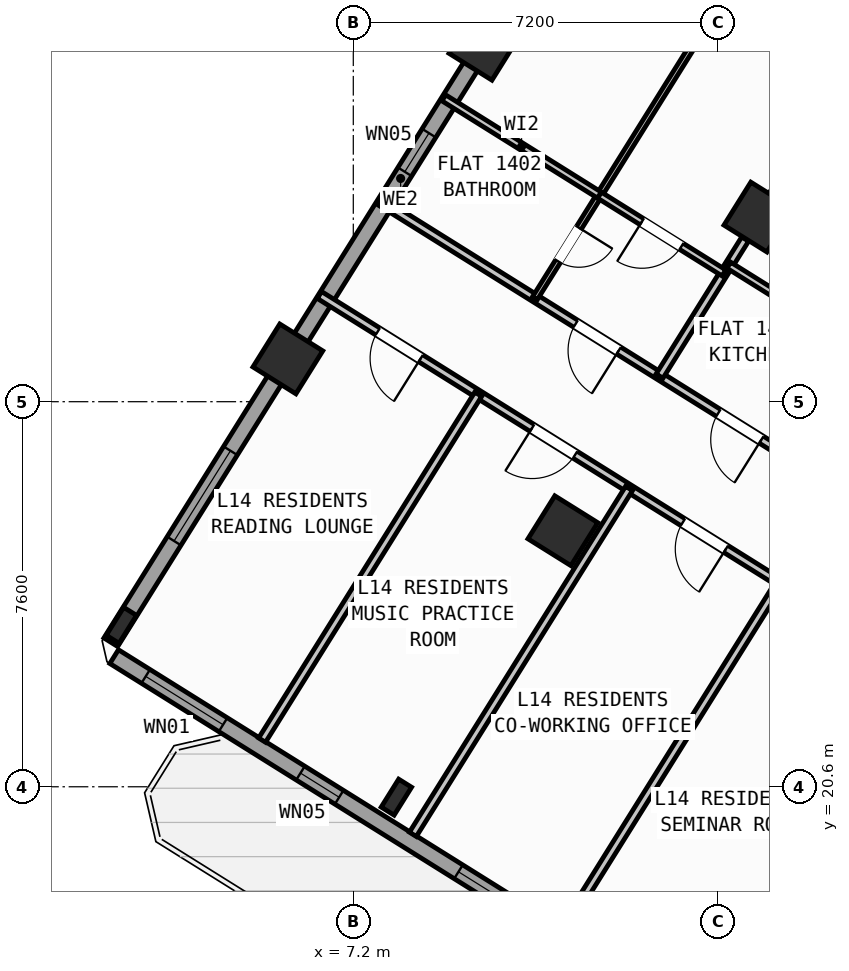
"""IFC4 building model, lengths in metres.
Left out: names, types, materials, properties, quantities, classifications, styles, units other than length and angle.
Written with IfcOpenShell. Run it as: python <this file> out.ifc"""

import sys

from ifc_helpers import new_model, si_unit, direction, frame, frame_2d, origin, origin_2d, place, context, subcontext, project, spatial, rectangle, hollow_rectangle, i_section, extrude, source, transform, mapped, element, fill, save


model = new_model("IFC4")
c1 = context("Model", 3, precision=1e-05, world=origin(), true_north=direction((0.0, 1.0)))
c2 = subcontext(c1, "Body", "Model", "MODEL_VIEW")
j1 = project(units=[si_unit("LENGTHUNIT", "METRE"), si_unit("PLANEANGLEUNIT", "RADIAN")], contexts=[c1])
p1 = place(None, origin())
s1 = spatial("IfcSite", under=j1, at=p1, CompositionType="ELEMENT")
p2 = place(p1, origin())
s2 = spatial("IfcBuilding", under=s1, at=p2, CompositionType="ELEMENT")
p3 = place(p2, frame((0.0, 0.0, 56.4)))
s3 = spatial("IfcBuildingStorey", under=s2, at=p3, CompositionType="ELEMENT", Elevation=56.4)
m1 = source(origin(), c2, "Body", "SweptSolid", [
    extrude(hollow_rectangle(XDim=1.0, YDim=1.0, WallThickness=0.04, at=origin_2d()), origin(), (0.0, 0.0, 1.0), 3.6),
])
for number, where, z_axis, x_axis in (
    (1, (15.205, 31.844, 0.0), (0.0, 0.0, 1.0), (-0.848, 0.53, 0.0)),
    (2, (11.336, 25.653, 0.0), (0.0, 0.0, 1.0), (-0.848, 0.53, 0.0)),
):
    element("IfcColumn", number, at=place(p3, frame(where, z_axis=z_axis, x_axis=x_axis)), inside=s3, PredefinedType="COLUMN", context=c2, shape_type="MappedRepresentation", body=[
        mapped(m1, transform((0.0, 0.0, 0.0), scale=1.0)),
    ])
m2 = source(origin(), c2, "Body", "SweptSolid", [
    extrude(i_section(OverallWidth=0.3, OverallDepth=0.65, WebThickness=0.016, FlangeThickness=0.031, at=origin_2d()), origin(), (0.0, 0.0, 1.0), 3.6),
])
p4 = place(p3, frame((8.051, 20.395, 0.0), z_axis=(0.0, 0.0, 1.0), x_axis=(-0.848048096156, 0.529919264233, 0.0)))
e3 = element("IfcColumn", 3, at=p4, inside=s3, PredefinedType="COLUMN", context=c2, shape_type="MappedRepresentation", body=[
    mapped(m2, transform((0.0, 0.0, 0.0), scale=1.0)),
])
for number, where, z_axis, x_axis in (
    (4, (9.777, 35.235, 0.0), (0.0, 0.0, 1.0), (-0.848, 0.53, 0.0)),
    (5, (5.909, 29.044, 0.0), (0.0, 0.0, 1.0), (-0.848, 0.53, 0.0)),
):
    element("IfcColumn", number, at=place(p3, frame(where, z_axis=z_axis, x_axis=x_axis)), inside=s3, PredefinedType="COLUMN", context=c2, shape_type="MappedRepresentation", body=[
        mapped(m1, transform((0.0, 0.0, 0.0), scale=1.0)),
    ])
p5 = place(p3, frame((2.623, 23.786, 0.0), z_axis=(0.0, 0.0, 1.0), x_axis=(-0.848048096156, 0.529919264233, 0.0)))
e6 = element("IfcColumn", 6, at=p5, inside=s3, PredefinedType="COLUMN", context=c2, shape_type="MappedRepresentation", body=[
    mapped(m2, transform((0.0, 0.0, 0.0), scale=1.0)),
])
p6 = place(p3, frame((29.268, 6.429, 0.0), z_axis=(0.0, 0.0, 1.0), x_axis=(-0.848049971435, 0.529916263149, 0.0)))
e7 = element("IfcWall", 7, at=p6, inside=s3, PredefinedType="STANDARD", context=c2, shape_type="SweptSolid", body=[
    extrude(rectangle(XDim=31.588, YDim=0.32, at=frame_2d((15.794, 0.0))), origin(), (0.0, 0.0, 1.0), 3.35),
])
p7 = place(p6, frame((16.235, 0.0, 0.0)))
e8 = element("IfcOpeningElement", 8, at=p7, cuts=e7, PredefinedType="OPENING", context=c2, shape_type="SweptSolid", body=[
    extrude(rectangle(XDim=1.2, YDim=2.15, at=frame_2d((0.6, 1.075))), frame((0.0, 0.17, 0.0), z_axis=(0.0, -1.0, 0.0), x_axis=(1.0, 0.0, 0.0)), (0.0, 0.0, 1.0), 0.34),
])
p8 = place(p6, frame((2.989, 0.0, 0.8)))
e9 = element("IfcOpeningElement", 9, at=p8, cuts=e7, PredefinedType="OPENING", context=c2, shape_type="SweptSolid", body=[
    extrude(rectangle(XDim=2.1, YDim=1.55, at=frame_2d((1.05, 0.775))), frame((0.0, 0.17, 0.0), z_axis=(0.0, -1.0, 0.0), x_axis=(1.0, 0.0, 0.0)), (0.0, 0.0, 1.0), 0.34),
])
p9 = place(p6, frame((8.359, 0.0, 0.8)))
e10 = element("IfcOpeningElement", 10, at=p9, cuts=e7, PredefinedType="OPENING", context=c2, shape_type="SweptSolid", body=[
    extrude(rectangle(XDim=2.1, YDim=1.55, at=frame_2d((1.05, 0.775))), frame((0.0, 0.17, 0.0), z_axis=(0.0, -1.0, 0.0), x_axis=(1.0, 0.0, 0.0)), (0.0, 0.0, 1.0), 0.34),
])
p10 = place(p6, frame((13.284, 0.0, 0.95)))
e11 = element("IfcOpeningElement", 11, at=p10, cuts=e7, PredefinedType="OPENING", context=c2, shape_type="SweptSolid", body=[
    extrude(rectangle(XDim=1.2, YDim=1.4, at=frame_2d((0.6, 0.7))), frame((0.0, 0.17, 0.0), z_axis=(0.0, -1.0, 0.0), x_axis=(1.0, 0.0, 0.0)), (0.0, 0.0, 1.0), 0.34),
])
p11 = place(p6, frame((22.374, 0.0, 0.95)))
e12 = element("IfcOpeningElement", 12, at=p11, cuts=e7, PredefinedType="OPENING", context=c2, shape_type="SweptSolid", body=[
    extrude(rectangle(XDim=1.2, YDim=1.4, at=frame_2d((0.6, 0.7))), frame((0.0, 0.17, 0.0), z_axis=(0.0, -1.0, 0.0), x_axis=(1.0, 0.0, 0.0)), (0.0, 0.0, 1.0), 0.34),
])
p12 = place(p6, frame((26.351, 0.0, 1.0)))
e13 = element("IfcOpeningElement", 13, at=p12, cuts=e7, PredefinedType="OPENING", context=c2, shape_type="SweptSolid", body=[
    extrude(rectangle(XDim=0.9, YDim=1.25, at=frame_2d((0.45, 0.625))), frame((0.0, 0.17, 0.0), z_axis=(0.0, -1.0, 0.0), x_axis=(1.0, 0.0, 0.0)), (0.0, 0.0, 1.0), 0.34),
])
p13 = place(p6, frame((29.052, 0.0, 0.85)))
e14 = element("IfcOpeningElement", 14, at=p13, cuts=e7, PredefinedType="OPENING", context=c2, shape_type="SweptSolid", body=[
    extrude(rectangle(XDim=1.8, YDim=1.5, at=frame_2d((0.9, 0.75))), frame((0.0, 0.17, 0.0), z_axis=(0.0, -1.0, 0.0), x_axis=(1.0, 0.0, 0.0)), (0.0, 0.0, 1.0), 0.34),
])
p14 = place(p3, frame((2.415, 23.452, 0.0), z_axis=(0.0, 0.0, 1.0), x_axis=(0.52991049553, 0.848053575387, 0.0)))
e15 = element("IfcWall", 15, at=p14, inside=s3, PredefinedType="STANDARD", context=c2, shape_type="SweptSolid", body=[
    extrude(rectangle(XDim=21.587, YDim=0.32, at=frame_2d((10.794, 0.0))), origin(), (0.0, 0.0, 1.0), 2.725),
])
p15 = place(p14, frame((2.356, 0.0, 0.8)))
e16 = element("IfcOpeningElement", 16, at=p15, cuts=e15, PredefinedType="OPENING", context=c2, shape_type="SweptSolid", body=[
    extrude(rectangle(XDim=2.1, YDim=1.55, at=frame_2d((1.05, 0.775))), frame((0.0, 0.17, 0.0), z_axis=(0.0, -1.0, 0.0), x_axis=(1.0, 0.0, 0.0)), (0.0, 0.0, 1.0), 0.34),
])
p16 = place(p14, frame((10.949, 0.0, 1.0)))
e17 = element("IfcOpeningElement", 17, at=p16, cuts=e15, PredefinedType="OPENING", context=c2, shape_type="SweptSolid", body=[
    extrude(rectangle(XDim=0.9, YDim=1.25, at=frame_2d((0.45, 0.625))), frame((0.0, 0.17, 0.0), z_axis=(0.0, -1.0, 0.0), x_axis=(1.0, 0.0, 0.0)), (0.0, 0.0, 1.0), 0.34),
])
p17 = place(p14, frame((15.394, 0.0, 0.85)))
e18 = element("IfcOpeningElement", 18, at=p17, cuts=e15, PredefinedType="OPENING", context=c2, shape_type="SweptSolid", body=[
    extrude(rectangle(XDim=1.5, YDim=1.5, at=frame_2d((0.75, 0.75))), frame((0.0, 0.17, 0.0), z_axis=(0.0, -1.0, 0.0), x_axis=(1.0, 0.0, 0.0)), (0.0, 0.0, 1.0), 0.34),
])
p18 = place(p14, frame((18.194, 0.0, 0.85)))
e19 = element("IfcOpeningElement", 19, at=p18, cuts=e15, PredefinedType="OPENING", context=c2, shape_type="SweptSolid", body=[
    extrude(rectangle(XDim=1.5, YDim=1.5, at=frame_2d((0.75, 0.75))), frame((0.0, 0.17, 0.0), z_axis=(0.0, -1.0, 0.0), x_axis=(1.0, 0.0, 0.0)), (0.0, 0.0, 1.0), 0.34),
])
p19 = place(p3, frame((14.138, 41.825, 0.0), z_axis=(0.0, 0.0, 1.0), x_axis=(0.848046498049, -0.529921821731, 0.0)))
e20 = element("IfcWall", 20, at=p19, inside=s3, PredefinedType="STANDARD", context=c2, shape_type="SweptSolid", body=[
    extrude(rectangle(XDim=31.588, YDim=0.32, at=frame_2d((15.794, 0.0))), origin(), (0.0, 0.0, 1.0), 3.35),
])
p20 = place(p19, frame((9.772, 0.0, 0.0)))
e21 = element("IfcOpeningElement", 21, at=p20, cuts=e20, PredefinedType="OPENING", context=c2, shape_type="SweptSolid", body=[
    extrude(rectangle(XDim=1.05, YDim=2.15, at=frame_2d((0.525, 1.075))), frame((0.0, 0.17, 0.0), z_axis=(0.0, -1.0, 0.0), x_axis=(1.0, 0.0, 0.0)), (0.0, 0.0, 1.0), 0.34),
])
p21 = place(p19, frame((0.966, 0.0, 0.85)))
e22 = element("IfcOpeningElement", 22, at=p21, cuts=e20, PredefinedType="OPENING", context=c2, shape_type="SweptSolid", body=[
    extrude(rectangle(XDim=1.5, YDim=1.5, at=frame_2d((0.75, 0.75))), frame((0.0, 0.17, 0.0), z_axis=(0.0, -1.0, 0.0), x_axis=(1.0, 0.0, 0.0)), (0.0, 0.0, 1.0), 0.34),
])
p22 = place(p19, frame((4.121, 0.0, 1.0)))
e23 = element("IfcOpeningElement", 23, at=p22, cuts=e20, PredefinedType="OPENING", context=c2, shape_type="SweptSolid", body=[
    extrude(rectangle(XDim=0.9, YDim=1.25, at=frame_2d((0.45, 0.625))), frame((0.0, 0.17, 0.0), z_axis=(0.0, -1.0, 0.0), x_axis=(1.0, 0.0, 0.0)), (0.0, 0.0, 1.0), 0.34),
])
p23 = place(p19, frame((13.899, 0.0, 0.85)))
e24 = element("IfcOpeningElement", 24, at=p23, cuts=e20, PredefinedType="OPENING", context=c2, shape_type="SweptSolid", body=[
    extrude(rectangle(XDim=1.5, YDim=1.5, at=frame_2d((0.75, 0.75))), frame((0.0, 0.17, 0.0), z_axis=(0.0, -1.0, 0.0), x_axis=(1.0, 0.0, 0.0)), (0.0, 0.0, 1.0), 0.34),
])
p24 = place(p19, frame((22.019, 0.0, 0.95)))
e25 = element("IfcOpeningElement", 25, at=p24, cuts=e20, PredefinedType="OPENING", context=c2, shape_type="SweptSolid", body=[
    extrude(rectangle(XDim=1.2, YDim=1.4, at=frame_2d((0.6, 0.7))), frame((0.0, 0.17, 0.0), z_axis=(0.0, -1.0, 0.0), x_axis=(1.0, 0.0, 0.0)), (0.0, 0.0, 1.0), 0.34),
])
p25 = place(p19, frame((27.569, 0.0, 0.95)))
e26 = element("IfcOpeningElement", 26, at=p25, cuts=e20, PredefinedType="OPENING", context=c2, shape_type="SweptSolid", body=[
    extrude(rectangle(XDim=1.2, YDim=1.4, at=frame_2d((0.6, 0.7))), frame((0.0, 0.17, 0.0), z_axis=(0.0, -1.0, 0.0), x_axis=(1.0, 0.0, 0.0)), (0.0, 0.0, 1.0), 0.34),
])
p26 = place(p3, frame((21.885, 23.306, 0.0), z_axis=(0.0, 0.0, 1.0), x_axis=(-0.848052408131, 0.529912363569, 0.0)))
e27 = element("IfcWall", 27, at=p26, inside=s3, PredefinedType="PARTITIONING", context=c2, shape_type="SweptSolid", body=[
    extrude(rectangle(XDim=16.73, YDim=0.16, at=frame_2d((8.365, 0.0))), origin(), (0.0, 0.0, 1.0), 3.34),
])
p27 = place(p26, frame((1.395, 0.0, 0.0)))
e28 = element("IfcOpeningElement", 28, at=p27, cuts=e27, PredefinedType="OPENING", context=c2, shape_type="SweptSolid", body=[
    extrude(rectangle(XDim=1.0, YDim=2.1, at=frame_2d((0.5, 1.05))), frame((0.0, 0.09, 0.0), z_axis=(0.0, -1.0, 0.0), x_axis=(1.0, 0.0, 0.0)), (0.0, 0.0, 1.0), 0.18),
])
p28 = place(p26, frame((7.82, 0.0, 0.0)))
e29 = element("IfcOpeningElement", 29, at=p28, cuts=e27, PredefinedType="OPENING", context=c2, shape_type="SweptSolid", body=[
    extrude(rectangle(XDim=1.0, YDim=2.1, at=frame_2d((0.5, 1.05))), frame((0.0, 0.09, 0.0), z_axis=(0.0, -1.0, 0.0), x_axis=(1.0, 0.0, 0.0)), (0.0, 0.0, 1.0), 0.18),
])
p29 = place(p26, frame((11.14, 0.0, 0.0)))
e30 = element("IfcOpeningElement", 30, at=p29, cuts=e27, PredefinedType="OPENING", context=c2, shape_type="SweptSolid", body=[
    extrude(rectangle(XDim=1.0, YDim=2.1, at=frame_2d((0.5, 1.05))), frame((0.0, 0.09, 0.0), z_axis=(0.0, -1.0, 0.0), x_axis=(1.0, 0.0, 0.0)), (0.0, 0.0, 1.0), 0.18),
])
p30 = place(p3, frame((20.719, 21.44, 0.0), z_axis=(0.0, 0.0, 1.0), x_axis=(-0.848048310262, 0.529918921593, 0.0)))
e31 = element("IfcWall", 31, at=p30, inside=s3, PredefinedType="PARTITIONING", context=c2, shape_type="SweptSolid", body=[
    extrude(rectangle(XDim=16.73, YDim=0.16, at=frame_2d((8.365, 0.0))), origin(), (0.0, 0.0, 1.0), 3.34),
])
p31 = place(p30, frame((0.92, 0.0, 0.0)))
e32 = element("IfcOpeningElement", 32, at=p31, cuts=e31, PredefinedType="OPENING", context=c2, shape_type="SweptSolid", body=[
    extrude(rectangle(XDim=1.0, YDim=2.1, at=frame_2d((0.5, 1.05))), frame((0.0, 0.09, 0.0), z_axis=(0.0, -1.0, 0.0), x_axis=(1.0, 0.0, 0.0)), (0.0, 0.0, 1.0), 0.18),
])
p32 = place(p30, frame((4.408, 0.0, 0.0)))
e33 = element("IfcOpeningElement", 33, at=p32, cuts=e31, PredefinedType="OPENING", context=c2, shape_type="SweptSolid", body=[
    extrude(rectangle(XDim=1.0, YDim=2.1, at=frame_2d((0.5, 1.05))), frame((0.0, 0.09, 0.0), z_axis=(0.0, -1.0, 0.0), x_axis=(1.0, 0.0, 0.0)), (0.0, 0.0, 1.0), 0.18),
])
p33 = place(p30, frame((7.271, 0.0, 0.0)))
e34 = element("IfcOpeningElement", 34, at=p33, cuts=e31, PredefinedType="OPENING", context=c2, shape_type="SweptSolid", body=[
    extrude(rectangle(XDim=1.0, YDim=2.1, at=frame_2d((0.5, 1.05))), frame((0.0, 0.09, 0.0), z_axis=(0.0, -1.0, 0.0), x_axis=(1.0, 0.0, 0.0)), (0.0, 0.0, 1.0), 0.18),
])
p34 = place(p30, frame((10.78, 0.0, 0.0)))
e35 = element("IfcOpeningElement", 35, at=p34, cuts=e31, PredefinedType="OPENING", context=c2, shape_type="SweptSolid", body=[
    extrude(rectangle(XDim=1.0, YDim=2.1, at=frame_2d((0.5, 1.05))), frame((0.0, 0.09, 0.0), z_axis=(0.0, -1.0, 0.0), x_axis=(1.0, 0.0, 0.0)), (0.0, 0.0, 1.0), 0.18),
])
p35 = place(p30, frame((14.372, 0.0, 0.0)))
e36 = element("IfcOpeningElement", 36, at=p35, cuts=e31, PredefinedType="OPENING", context=c2, shape_type="SweptSolid", body=[
    extrude(rectangle(XDim=1.0, YDim=2.1, at=frame_2d((0.5, 1.05))), frame((0.0, 0.09, 0.0), z_axis=(0.0, -1.0, 0.0), x_axis=(1.0, 0.0, 0.0)), (0.0, 0.0, 1.0), 0.18),
])
p36 = place(p3, frame((18.31, 22.946, 0.0), z_axis=(0.0, 0.0, 1.0), x_axis=(-0.529914428959, -0.848051117552, 0.0)))
e37 = element("IfcWall", 37, at=p36, inside=s3, PredefinedType="PARTITIONING", context=c2, shape_type="SweptSolid", body=[
    extrude(rectangle(XDim=8.05, YDim=0.16, at=frame_2d((4.025, 0.0))), origin(), (0.0, 0.0, 1.0), 3.34),
])
p37 = place(p3, frame((15.618, 24.628, 0.0), z_axis=(0.0, 0.0, 1.0), x_axis=(-0.529928058306, -0.848042600947, 0.0)))
e38 = element("IfcWall", 38, at=p37, inside=s3, PredefinedType="PARTITIONING", context=c2, shape_type="SweptSolid", body=[
    extrude(rectangle(XDim=8.05, YDim=0.16, at=frame_2d((4.025, 0.0))), origin(), (0.0, 0.0, 1.0), 2.995),
])
p38 = place(p3, frame((12.642, 26.488, 0.0), z_axis=(0.0, 0.0, 1.0), x_axis=(-0.529914428959, -0.848051117552, 0.0)))
e39 = element("IfcWall", 39, at=p38, inside=s3, PredefinedType="PARTITIONING", context=c2, shape_type="SweptSolid", body=[
    extrude(rectangle(XDim=8.05, YDim=0.16, at=frame_2d((4.025, 0.0))), origin(), (0.0, 0.0, 1.0), 3.34),
])
p39 = place(p3, frame((9.666, 28.347, 0.0), z_axis=(0.0, 0.0, 1.0), x_axis=(-0.529928058306, -0.848042600947, 0.0)))
e40 = element("IfcWall", 40, at=p39, inside=s3, PredefinedType="PARTITIONING", context=c2, shape_type="SweptSolid", body=[
    extrude(rectangle(XDim=8.05, YDim=0.16, at=frame_2d((4.025, 0.0))), origin(), (0.0, 0.0, 1.0), 3.34),
])
p40 = place(p3, frame((18.802, 37.6, 0.0), z_axis=(0.0, 0.0, 1.0), x_axis=(-0.529915015264, -0.848050751193, 0.0)))
e41 = element("IfcWall", 41, at=p40, inside=s3, PredefinedType="PARTITIONING", context=c2, shape_type="SweptSolid", body=[
    extrude(rectangle(XDim=6.276, YDim=0.16, at=frame_2d((3.138, 0.0))), origin(), (0.0, 0.0, 1.0), 2.725),
])
p41 = place(p3, frame((14.933, 31.409, 0.0), z_axis=(0.0, 0.0, 1.0), x_axis=(-0.529875025416, -0.848075738033, 0.0)))
e42 = element("IfcWall", 42, at=p41, inside=s3, PredefinedType="PARTITIONING", context=c2, shape_type="SweptSolid", body=[
    extrude(rectangle(XDim=3.188, YDim=0.16, at=frame_2d((1.594, 0.0))), origin(), (0.0, 0.0, 1.0), 2.725),
])
p42 = place(p3, frame((20.039, 27.502, 0.0), z_axis=(0.0, 0.0, 1.0), x_axis=(-0.848039019877, 0.529933789039, 0.0)))
e43 = element("IfcWall", 43, at=p42, inside=s3, PredefinedType="PLUMBINGWALL", context=c2, shape_type="SweptSolid", body=[
    extrude(rectangle(XDim=6.4, YDim=0.14, at=frame_2d((3.2, 0.0))), origin(), (0.0, 0.0, 1.0), 3.34),
])
p43 = place(p42, frame((2.824, 0.0, 0.0)))
e44 = element("IfcOpeningElement", 44, at=p43, cuts=e43, PredefinedType="OPENING", context=c2, shape_type="SweptSolid", body=[
    extrude(rectangle(XDim=0.78, YDim=2.05, at=frame_2d((0.39, 1.025))), frame((0.0, 0.08, 0.0), z_axis=(0.0, -1.0, 0.0), x_axis=(1.0, 0.0, 0.0)), (0.0, 0.0, 1.0), 0.16),
])
p44 = place(p3, frame((16.995, 40.182, 0.0), z_axis=(0.0, 0.0, 1.0), x_axis=(-0.529927783988, -0.848042772363, 0.0)))
e45 = element("IfcWall", 45, at=p44, inside=s3, PredefinedType="PARTITIONING", context=c2, shape_type="SweptSolid", body=[
    extrude(rectangle(XDim=11.72, YDim=0.11, at=frame_2d((5.86, 0.0))), origin(), (0.0, 0.0, 1.0), 3.34),
])
p45 = place(p44, frame((10.08, 0.0, 0.0)))
e46 = element("IfcOpeningElement", 46, at=p45, cuts=e45, PredefinedType="OPENING", context=c2, shape_type="SweptSolid", body=[
    extrude(rectangle(XDim=0.78, YDim=2.05, at=frame_2d((0.39, 1.025))), frame((0.0, 0.065, 0.0), z_axis=(0.0, -1.0, 0.0), x_axis=(1.0, 0.0, 0.0)), (0.0, 0.0, 1.0), 0.13),
])
p46 = place(p44, frame((4.2, 0.0, 0.0)))
e47 = element("IfcOpeningElement", 47, at=p46, cuts=e45, PredefinedType="OPENING", context=c2, shape_type="SweptSolid", body=[
    extrude(rectangle(XDim=0.92, YDim=2.08, at=frame_2d((0.46, 1.04))), frame((0.0, 0.065, 0.0), z_axis=(0.0, -1.0, 0.0), x_axis=(1.0, 0.0, 0.0)), (0.0, 0.0, 1.0), 0.13),
])
p47 = place(p3, frame((14.516, 30.741, 0.0), z_axis=(0.0, 0.0, 1.0), x_axis=(-0.848059786386, 0.529900555496, 0.0)))
e48 = element("IfcWall", 48, at=p47, inside=s3, PredefinedType="PLUMBINGWALL", context=c2, shape_type="SweptSolid", body=[
    extrude(rectangle(XDim=2.9, YDim=0.14, at=frame_2d((1.45, 0.0))), origin(), (0.0, 0.0, 1.0), 3.34),
])
p48 = place(p47, frame((0.99, 0.0, 0.0)))
e49 = element("IfcOpeningElement", 49, at=p48, cuts=e48, PredefinedType="OPENING", context=c2, shape_type="SweptSolid", body=[
    extrude(rectangle(XDim=0.92, YDim=2.08, at=frame_2d((0.46, 1.04))), frame((0.0, 0.08, 0.0), z_axis=(0.0, -1.0, 0.0), x_axis=(1.0, 0.0, 0.0)), (0.0, 0.0, 1.0), 0.16),
])
p49 = place(p3, frame((12.056, 32.278, 0.0), z_axis=(0.0, 0.0, 1.0), x_axis=(-0.848039976902, 0.529932257535, 0.0)))
e50 = element("IfcWall", 50, at=p49, inside=s3, PredefinedType="PLUMBINGWALL", context=c2, shape_type="SweptSolid", body=[
    extrude(rectangle(XDim=3.62, YDim=0.14, at=frame_2d((1.81, 0.0))), origin(), (0.0, 0.0, 1.0), 3.34),
])
m3 = source(origin(), c2, "Body", "SweptSolid", [
    extrude(rectangle(XDim=1.2, YDim=1.4, at=frame_2d((0.6, 0.7))), frame((0.0, 0.03, 0.0), z_axis=(0.0, -1.0, 0.0), x_axis=(1.0, 0.0, 0.0)), (0.0, 0.0, 1.0), 0.06),
])
p50 = place(p11, origin())
e51 = element("IfcWindow", 51, at=p50, inside=s3, PartitioningType="SINGLE_PANEL", PredefinedType="WINDOW", context=c2, shape_type="MappedRepresentation", body=[
    mapped(m3, transform((0.0, 0.0, 0.0), scale=1.0)),
])
fill(e12, e51)
m4 = source(origin(), c2, "Body", "SweptSolid", [
    extrude(rectangle(XDim=0.9, YDim=1.25, at=frame_2d((0.45, 0.625))), frame((0.0, 0.03, 0.0), z_axis=(0.0, -1.0, 0.0), x_axis=(1.0, 0.0, 0.0)), (0.0, 0.0, 1.0), 0.06),
])
p51 = place(p12, origin())
e52 = element("IfcWindow", 52, at=p51, inside=s3, PartitioningType="SINGLE_PANEL", PredefinedType="WINDOW", context=c2, shape_type="MappedRepresentation", body=[
    mapped(m4, transform((0.0, 0.0, 0.0), scale=1.0)),
])
fill(e13, e52)
m5 = source(origin(), c2, "Body", "SweptSolid", [
    extrude(rectangle(XDim=1.8, YDim=1.5, at=frame_2d((0.9, 0.75))), frame((0.0, 0.03, 0.0), z_axis=(0.0, -1.0, 0.0), x_axis=(1.0, 0.0, 0.0)), (0.0, 0.0, 1.0), 0.06),
])
p52 = place(p13, origin())
e53 = element("IfcWindow", 53, at=p52, inside=s3, PartitioningType="SINGLE_PANEL", PredefinedType="WINDOW", context=c2, shape_type="MappedRepresentation", body=[
    mapped(m5, transform((0.0, 0.0, 0.0), scale=1.0)),
])
fill(e14, e53)
m6 = source(origin(), c2, "Body", "SweptSolid", [
    extrude(rectangle(XDim=2.1, YDim=1.55, at=frame_2d((1.05, 0.775))), frame((0.0, 0.03, 0.0), z_axis=(0.0, -1.0, 0.0), x_axis=(1.0, 0.0, 0.0)), (0.0, 0.0, 1.0), 0.06),
])
p53 = place(p15, origin())
e54 = element("IfcWindow", 54, at=p53, inside=s3, PartitioningType="SINGLE_PANEL", PredefinedType="WINDOW", context=c2, shape_type="MappedRepresentation", body=[
    mapped(m6, transform((0.0, 0.0, 0.0), scale=1.0)),
])
fill(e16, e54)
p54 = place(p16, origin())
e55 = element("IfcWindow", 55, at=p54, inside=s3, PartitioningType="SINGLE_PANEL", PredefinedType="WINDOW", context=c2, shape_type="MappedRepresentation", body=[
    mapped(m4, transform((0.0, 0.0, 0.0), scale=1.0)),
])
fill(e17, e55)
m7 = source(origin(), c2, "Body", "SweptSolid", [
    extrude(rectangle(XDim=1.0, YDim=2.1, at=frame_2d((0.5, 1.05))), frame((0.0, 0.025, 0.0), z_axis=(0.0, -1.0, 0.0), x_axis=(1.0, 0.0, 0.0)), (0.0, 0.0, 1.0), 0.05),
])
p55 = place(p33, origin())
e56 = element("IfcDoor", 56, at=p55, inside=s3, OperationType="SINGLE_SWING_LEFT", PredefinedType="DOOR", context=c2, shape_type="MappedRepresentation", body=[
    mapped(m7, transform((0.0, 0.0, 0.0), scale=1.0)),
])
fill(e34, e56)
p56 = place(p34, origin())
e57 = element("IfcDoor", 57, at=p56, inside=s3, OperationType="SINGLE_SWING_RIGHT", PredefinedType="DOOR", context=c2, shape_type="MappedRepresentation", body=[
    mapped(m7, transform((0.0, 0.0, 0.0), scale=1.0)),
])
fill(e35, e57)
p57 = place(p35, origin())
e58 = element("IfcDoor", 58, at=p57, inside=s3, OperationType="SINGLE_SWING_LEFT", PredefinedType="DOOR", context=c2, shape_type="MappedRepresentation", body=[
    mapped(m7, transform((0.0, 0.0, 0.0), scale=1.0)),
])
fill(e36, e58)
p58 = place(p28, origin())
e59 = element("IfcDoor", 59, at=p58, inside=s3, OperationType="SINGLE_SWING_LEFT", PredefinedType="DOOR", context=c2, shape_type="MappedRepresentation", body=[
    mapped(m7, transform((0.0, 0.0, 0.0), scale=1.0)),
])
fill(e29, e59)
p59 = place(p29, origin())
e60 = element("IfcDoor", 60, at=p59, inside=s3, OperationType="SINGLE_SWING_LEFT", PredefinedType="DOOR", context=c2, shape_type="MappedRepresentation", body=[
    mapped(m7, transform((0.0, 0.0, 0.0), scale=1.0)),
])
fill(e30, e60)
m8 = source(origin(), c2, "Body", "SweptSolid", [
    extrude(rectangle(XDim=0.92, YDim=2.08, at=frame_2d((0.46, 1.04))), frame((0.0, 0.025, 0.0), z_axis=(0.0, -1.0, 0.0), x_axis=(1.0, 0.0, 0.0)), (0.0, 0.0, 1.0), 0.05),
])
p60 = place(p48, origin())
e61 = element("IfcDoor", 61, at=p60, inside=s3, OperationType="SINGLE_SWING_RIGHT", PredefinedType="DOOR", context=c2, shape_type="MappedRepresentation", body=[
    mapped(m8, transform((0.0, 0.0, 0.0), scale=1.0)),
])
fill(e49, e61)
m9 = source(origin(), c2, "Body", "SweptSolid", [
    extrude(rectangle(XDim=0.78, YDim=2.05, at=frame_2d((0.39, 1.025))), frame((0.0, 0.025, 0.0), z_axis=(0.0, -1.0, 0.0), x_axis=(1.0, 0.0, 0.0)), (0.0, 0.0, 1.0), 0.05),
])
p61 = place(p45, origin())
e62 = element("IfcDoor", 62, at=p61, inside=s3, OperationType="SINGLE_SWING_LEFT", PredefinedType="DOOR", context=c2, shape_type="MappedRepresentation", body=[
    mapped(m9, transform((0.0, 0.0, 0.0), scale=1.0)),
])
fill(e46, e62)
save(model, sys.argv[1])
